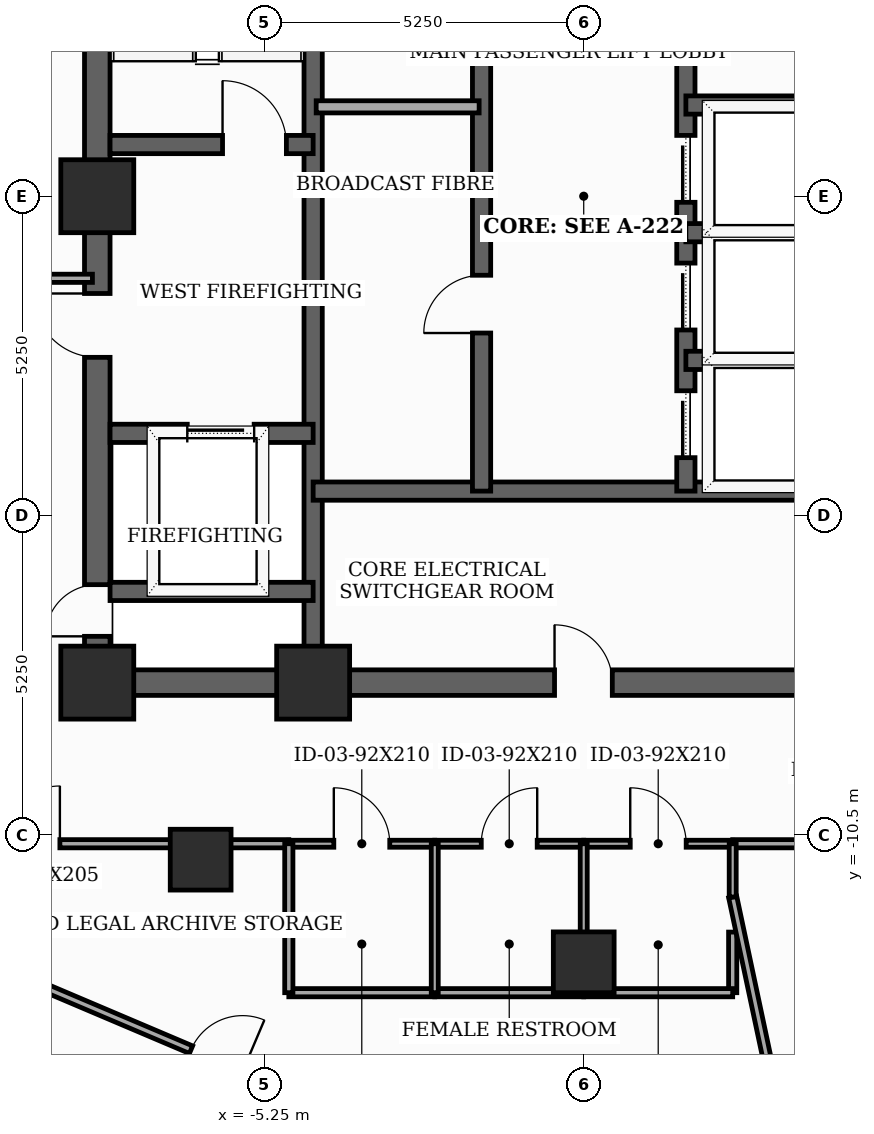
"""IFC4 building model, lengths in metres.
Left out: names, types, materials, properties, quantities, classifications, styles, units other than length and angle.
Written with IfcOpenShell. Run it as: python <this file> out.ifc"""

import sys

from ifc_helpers import new_model, si_unit, direction, frame, frame_2d, origin, origin_2d, place, context, subcontext, project, spatial, rectangle, extrude, element, fill, save


model = new_model("IFC4")
c1 = context("Model", 3, precision=1e-05, world=origin(), true_north=direction((0.0, 1.0)))
c2 = subcontext(c1, "Body", "Model", "MODEL_VIEW")
j1 = project(units=[si_unit("LENGTHUNIT", "METRE"), si_unit("PLANEANGLEUNIT", "RADIAN")], contexts=[c1])
p1 = place(None, origin())
s1 = spatial("IfcSite", under=j1, at=p1, CompositionType="ELEMENT")
p2 = place(p1, origin())
s2 = spatial("IfcBuilding", under=s1, at=p2, CompositionType="ELEMENT")
p3 = place(p2, frame((0.0, 0.0, 222.6)))
s3 = spatial("IfcBuildingStorey", under=s2, at=p3, CompositionType="ELEMENT", Elevation=222.6)
for number, where, z_axis, x_axis in (
    (1, (-8.0, -8.0, 0.0), (0.0, 0.0, 1.0), (1.0, 0.0, 0.0)),
    (2, (-4.45, -8.0, 0.0), (0.0, 0.0, 1.0), (1.0, 0.0, 0.0)),
    (3, (-8.0, 0.0, 0.0), (0.0, 0.0, 1.0), (1.0, 0.0, 0.0)),
):
    element("IfcColumn", number, at=place(p3, frame(where, z_axis=z_axis, x_axis=x_axis)), inside=s3, PredefinedType="COLUMN", context=c2, shape_type="SweptSolid", body=[
        extrude(rectangle(XDim=1.2, YDim=1.2, at=origin_2d()), origin(), (0.0, 0.0, 1.0), 3.7),
    ])
for number, where, z_axis, x_axis in (
    (4, (-6.3, -10.912, 0.0), (0.0, 0.0, 1.0), (1.0, 0.0, 0.0)),
    (5, (0.0, -12.6, 0.0), (0.0, 0.0, 1.0), (1.0, 0.0, 0.0)),
):
    element("IfcColumn", number, at=place(p3, frame(where, z_axis=z_axis, x_axis=x_axis)), inside=s3, PredefinedType="COLUMN", context=c2, shape_type="SweptSolid", body=[
        extrude(rectangle(XDim=1.0, YDim=1.0, at=origin_2d()), origin(), (0.0, 0.0, 1.0), 3.7),
    ])
p4 = place(p3, frame((-8.0, -8.0, 0.0), z_axis=(0.0, 0.0, 1.0), x_axis=(0.0, 1.0, 0.0)))
e6 = element("IfcWall", 6, at=p4, inside=s3, PredefinedType="SHEAR", context=c2, shape_type="SweptSolid", body=[
    extrude(rectangle(XDim=16.0, YDim=0.42, at=frame_2d((8.0, 0.0))), origin(), (0.0, 0.0, 1.0), 3.5),
])
p5 = place(p4, frame((0.761, 0.0, 0.0)))
e7 = element("IfcOpeningElement", 7, at=p5, cuts=e6, PredefinedType="OPENING", context=c2, shape_type="SweptSolid", body=[
    extrude(rectangle(XDim=0.85, YDim=2.02, at=frame_2d((0.425, 1.01))), frame((0.0, 0.22, 0.0), z_axis=(0.0, -1.0, 0.0), x_axis=(1.0, 0.0, 0.0)), (0.0, 0.0, 1.0), 0.44),
])
p6 = place(p4, frame((5.35, 0.0, 0.0)))
e8 = element("IfcOpeningElement", 8, at=p6, cuts=e6, PredefinedType="OPENING", context=c2, shape_type="SweptSolid", body=[
    extrude(rectangle(XDim=1.05, YDim=2.15, at=frame_2d((0.525, 1.075))), frame((0.0, 0.22, 0.0), z_axis=(0.0, -1.0, 0.0), x_axis=(1.0, 0.0, 0.0)), (0.0, 0.0, 1.0), 0.44),
])
p7 = place(p3, frame((-8.0, -8.0, 0.0), z_axis=(0.0, 0.0, 1.0), x_axis=(1.0, 0.0, 0.0)))
e9 = element("IfcWall", 9, at=p7, inside=s3, PredefinedType="SHEAR", context=c2, shape_type="SweptSolid", body=[
    extrude(rectangle(XDim=16.0, YDim=0.42, at=frame_2d((8.0, 0.0))), origin(), (0.0, 0.0, 1.0), 3.5),
])
p8 = place(p7, frame((7.52, 0.0, 0.0)))
e10 = element("IfcOpeningElement", 10, at=p8, cuts=e9, PredefinedType="OPENING", context=c2, shape_type="SweptSolid", body=[
    extrude(rectangle(XDim=0.95, YDim=2.1, at=frame_2d((0.475, 1.05))), frame((0.0, 0.22, 0.0), z_axis=(0.0, -1.0, 0.0), x_axis=(1.0, 0.0, 0.0)), (0.0, 0.0, 1.0), 0.44),
])
p9 = place(p3, frame((-4.45, -7.79, 0.0), z_axis=(0.0, 0.0, 1.0), x_axis=(0.0, 1.0, 0.0)))
e11 = element("IfcWall", 11, at=p9, inside=s3, PredefinedType="SHEAR", context=c2, shape_type="SweptSolid", body=[
    extrude(rectangle(XDim=15.58, YDim=0.3, at=frame_2d((7.79, 0.0))), origin(), (0.0, 0.0, 1.0), 3.5),
])
p10 = place(p3, frame((-7.79, 0.85, 0.0), z_axis=(0.0, 0.0, 1.0), x_axis=(1.0, 0.0, 0.0)))
e12 = element("IfcWall", 12, at=p10, inside=s3, PredefinedType="SHEAR", context=c2, shape_type="SweptSolid", body=[
    extrude(rectangle(XDim=3.34, YDim=0.3, at=frame_2d((1.67, 0.0))), origin(), (0.0, 0.0, 1.0), 3.5),
])
p11 = place(p10, frame((1.85, 0.0, 0.0)))
e13 = element("IfcOpeningElement", 13, at=p11, cuts=e12, PredefinedType="OPENING", context=c2, shape_type="SweptSolid", body=[
    extrude(rectangle(XDim=1.05, YDim=2.15, at=frame_2d((0.525, 1.075))), frame((0.0, 0.16, 0.0), z_axis=(0.0, -1.0, 0.0), x_axis=(1.0, 0.0, 0.0)), (0.0, 0.0, 1.0), 0.32),
])
p12 = place(p3, frame((-7.79, -3.9, 0.0), z_axis=(0.0, 0.0, 1.0), x_axis=(1.0, 0.0, 0.0)))
e14 = element("IfcWall", 14, at=p12, inside=s3, PredefinedType="SHEAR", context=c2, shape_type="SweptSolid", body=[
    extrude(rectangle(XDim=3.34, YDim=0.3, at=frame_2d((1.67, 0.0))), origin(), (0.0, 0.0, 1.0), 3.5),
])
p13 = place(p12, frame((1.27, 0.0, 0.0)))
e15 = element("IfcOpeningElement", 15, at=p13, cuts=e14, PredefinedType="OPENING", context=c2, shape_type="SweptSolid", body=[
    extrude(rectangle(XDim=1.1, YDim=2.1, at=frame_2d((0.55, 1.05))), frame((0.0, 0.16, 0.0), z_axis=(0.0, -1.0, 0.0), x_axis=(1.0, 0.0, 0.0)), (0.0, 0.0, 1.0), 0.32),
])
p14 = place(p3, frame((-7.79, -6.5, 0.0), z_axis=(0.0, 0.0, 1.0), x_axis=(1.0, 0.0, 0.0)))
e16 = element("IfcWall", 16, at=p14, inside=s3, PredefinedType="SHEAR", context=c2, shape_type="SweptSolid", body=[
    extrude(rectangle(XDim=3.34, YDim=0.3, at=frame_2d((1.67, 0.0))), origin(), (0.0, 0.0, 1.0), 3.5),
])
p15 = place(p3, frame((-4.45, -4.85, 0.0), z_axis=(0.0, 0.0, 1.0), x_axis=(1.0, 0.0, 0.0)))
e17 = element("IfcWall", 17, at=p15, inside=s3, PredefinedType="SHEAR", context=c2, shape_type="SweptSolid", body=[
    extrude(rectangle(XDim=8.9, YDim=0.3, at=frame_2d((4.45, 0.0))), origin(), (0.0, 0.0, 1.0), 3.5),
])
p16 = place(p3, frame((-1.68, -4.85, 0.0), z_axis=(0.0, 0.0, 1.0), x_axis=(0.0, 1.0, 0.0)))
e18 = element("IfcWall", 18, at=p16, inside=s3, PredefinedType="SHEAR", context=c2, shape_type="SweptSolid", body=[
    extrude(rectangle(XDim=12.64, YDim=0.3, at=frame_2d((6.32, 0.0))), origin(), (0.0, 0.0, 1.0), 3.5),
])
p17 = place(p16, frame((2.6, 0.0, 0.0)))
e19 = element("IfcOpeningElement", 19, at=p17, cuts=e18, PredefinedType="OPENING", context=c2, shape_type="SweptSolid", body=[
    extrude(rectangle(XDim=0.95, YDim=2.1, at=frame_2d((0.475, 1.05))), frame((0.0, 0.16, 0.0), z_axis=(0.0, -1.0, 0.0), x_axis=(1.0, 0.0, 0.0)), (0.0, 0.0, 1.0), 0.32),
])
p18 = place(p16, frame((8.8, 0.0, 0.0)))
e20 = element("IfcOpeningElement", 20, at=p18, cuts=e18, PredefinedType="OPENING", context=c2, shape_type="SweptSolid", body=[
    extrude(rectangle(XDim=0.95, YDim=2.1, at=frame_2d((0.475, 1.05))), frame((0.0, 0.16, 0.0), z_axis=(0.0, -1.0, 0.0), x_axis=(1.0, 0.0, 0.0)), (0.0, 0.0, 1.0), 0.32),
])
p19 = place(p3, frame((1.68, -4.85, 0.0), z_axis=(0.0, 0.0, 1.0), x_axis=(0.0, 1.0, 0.0)))
e21 = element("IfcWall", 21, at=p19, inside=s3, PredefinedType="SHEAR", context=c2, shape_type="SweptSolid", body=[
    extrude(rectangle(XDim=12.64, YDim=0.3, at=frame_2d((6.32, 0.0))), origin(), (0.0, 0.0, 1.0), 3.5),
])
p20 = place(p19, frame((0.55, 0.0, 0.0)))
e22 = element("IfcOpeningElement", 22, at=p20, cuts=e21, PredefinedType="OPENING", context=c2, shape_type="SweptSolid", body=[
    extrude(rectangle(XDim=1.1, YDim=2.1, at=frame_2d((0.55, 1.05))), frame((0.0, 0.16, 0.0), z_axis=(0.0, -1.0, 0.0), x_axis=(1.0, 0.0, 0.0)), (0.0, 0.0, 1.0), 0.32),
])
p21 = place(p19, frame((2.65, 0.0, 0.0)))
e23 = element("IfcOpeningElement", 23, at=p21, cuts=e21, PredefinedType="OPENING", context=c2, shape_type="SweptSolid", body=[
    extrude(rectangle(XDim=1.1, YDim=2.1, at=frame_2d((0.55, 1.05))), frame((0.0, 0.16, 0.0), z_axis=(0.0, -1.0, 0.0), x_axis=(1.0, 0.0, 0.0)), (0.0, 0.0, 1.0), 0.32),
])
p22 = place(p19, frame((4.75, 0.0, 0.0)))
e24 = element("IfcOpeningElement", 24, at=p22, cuts=e21, PredefinedType="OPENING", context=c2, shape_type="SweptSolid", body=[
    extrude(rectangle(XDim=1.1, YDim=2.1, at=frame_2d((0.55, 1.05))), frame((0.0, 0.16, 0.0), z_axis=(0.0, -1.0, 0.0), x_axis=(1.0, 0.0, 0.0)), (0.0, 0.0, 1.0), 0.32),
])
p23 = place(p19, frame((8.9, 0.0, 0.0)))
e25 = element("IfcOpeningElement", 25, at=p23, cuts=e21, PredefinedType="OPENING", context=c2, shape_type="SweptSolid", body=[
    extrude(rectangle(XDim=0.95, YDim=2.1, at=frame_2d((0.475, 1.05))), frame((0.0, 0.16, 0.0), z_axis=(0.0, -1.0, 0.0), x_axis=(1.0, 0.0, 0.0)), (0.0, 0.0, 1.0), 0.32),
])
for number, where, z_axis, x_axis in (
    (26, (1.68, 1.5, 0.0), (0.0, 0.0, 1.0), (1.0, 0.0, 0.0)),
    (27, (1.68, -2.7, 0.0), (0.0, 0.0, 1.0), (1.0, 0.0, 0.0)),
    (28, (1.68, -0.6, 0.0), (0.0, 0.0, 1.0), (1.0, 0.0, 0.0)),
):
    element("IfcWall", number, at=place(p3, frame(where, z_axis=z_axis, x_axis=x_axis)), inside=s3, PredefinedType="SHEAR", context=c2, shape_type="SweptSolid", body=[
        extrude(rectangle(XDim=2.77, YDim=0.3, at=frame_2d((1.385, 0.0))), origin(), (0.0, 0.0, 1.0), 3.5),
    ])
p24 = place(p3, frame((-4.4, 1.47, 0.0), z_axis=(0.0, 0.0, 1.0), x_axis=(1.0, 0.0, 0.0)))
e29 = element("IfcWall", 29, at=p24, inside=s3, PredefinedType="SOLIDWALL", context=c2, shape_type="SweptSolid", body=[
    extrude(rectangle(XDim=2.68, YDim=0.2, at=frame_2d((1.34, 0.0))), origin(), (0.0, 0.0, 1.0), 3.5),
])
p25 = place(p3, frame((-8.08, -1.35, 0.0), z_axis=(0.0, 0.0, 1.0), x_axis=(-1.0, 0.0, 0.0)))
e30 = element("IfcWall", 30, at=p25, inside=s3, PredefinedType="PARTITIONING", context=c2, shape_type="SweptSolid", body=[
    extrude(rectangle(XDim=2.57, YDim=0.135, at=frame_2d((1.285, 0.0))), origin(), (0.0, 0.0, 1.0), 2.885),
])
p26 = place(p3, frame((-10.15, -10.65, 0.0), z_axis=(0.0, 0.0, 1.0), x_axis=(1.0, 0.0, 0.0)))
e31 = element("IfcWall", 31, at=p26, inside=s3, PredefinedType="PARTITIONING", context=c2, shape_type="SweptSolid", body=[
    extrude(rectangle(XDim=5.3, YDim=0.135, at=frame_2d((2.65, 0.0))), origin(), (0.0, 0.0, 1.0), 2.075),
])
p27 = place(p26, frame((0.585, 0.0, 0.0)))
e32 = element("IfcOpeningElement", 32, at=p27, cuts=e31, PredefinedType="OPENING", context=c2, shape_type="SweptSolid", body=[
    extrude(rectangle(XDim=0.95, YDim=2.025, at=frame_2d((0.475, 1.012))), frame((0.0, 0.077, 0.0), z_axis=(0.0, -1.0, 0.0), x_axis=(1.0, 0.0, 0.0)), (0.0, 0.0, 1.0), 0.155),
])
p28 = place(p3, frame((-4.85, -10.65, 0.0), z_axis=(0.0, 0.0, 1.0), x_axis=(1.0, 0.0, 0.0)))
e33 = element("IfcWall", 33, at=p28, inside=s3, PredefinedType="PARTITIONING", context=c2, shape_type="SweptSolid", body=[
    extrude(rectangle(XDim=2.4, YDim=0.115, at=frame_2d((1.2, 0.0))), origin(), (0.0, 0.0, 1.0), 3.5),
])
p29 = place(p28, frame((0.74, 0.0, 0.0)))
e34 = element("IfcOpeningElement", 34, at=p29, cuts=e33, PredefinedType="OPENING", context=c2, shape_type="SweptSolid", body=[
    extrude(rectangle(XDim=0.92, YDim=2.1, at=frame_2d((0.46, 1.05))), frame((0.0, 0.067, 0.0), z_axis=(0.0, -1.0, 0.0), x_axis=(1.0, 0.0, 0.0)), (0.0, 0.0, 1.0), 0.135),
])
p30 = place(p3, frame((-2.45, -10.65, 0.0), z_axis=(0.0, 0.0, 1.0), x_axis=(1.0, 0.0, 0.0)))
e35 = element("IfcWall", 35, at=p30, inside=s3, PredefinedType="PARTITIONING", context=c2, shape_type="SweptSolid", body=[
    extrude(rectangle(XDim=2.45, YDim=0.115, at=frame_2d((1.225, 0.0))), origin(), (0.0, 0.0, 1.0), 2.885),
])
p31 = place(p30, frame((0.765, 0.0, 0.0)))
e36 = element("IfcOpeningElement", 36, at=p31, cuts=e35, PredefinedType="OPENING", context=c2, shape_type="SweptSolid", body=[
    extrude(rectangle(XDim=0.92, YDim=2.1, at=frame_2d((0.46, 1.05))), frame((0.0, 0.067, 0.0), z_axis=(0.0, -1.0, 0.0), x_axis=(1.0, 0.0, 0.0)), (0.0, 0.0, 1.0), 0.135),
])
p32 = place(p3, frame((0.0, -10.65, 0.0), z_axis=(0.0, 0.0, 1.0), x_axis=(1.0, 0.0, 0.0)))
e37 = element("IfcWall", 37, at=p32, inside=s3, PredefinedType="PARTITIONING", context=c2, shape_type="SweptSolid", body=[
    extrude(rectangle(XDim=2.45, YDim=0.115, at=frame_2d((1.225, 0.0))), origin(), (0.0, 0.0, 1.0), 3.5),
])
p33 = place(p32, frame((0.765, 0.0, 0.0)))
e38 = element("IfcOpeningElement", 38, at=p33, cuts=e37, PredefinedType="OPENING", context=c2, shape_type="SweptSolid", body=[
    extrude(rectangle(XDim=0.92, YDim=2.1, at=frame_2d((0.46, 1.05))), frame((0.0, 0.067, 0.0), z_axis=(0.0, -1.0, 0.0), x_axis=(1.0, 0.0, 0.0)), (0.0, 0.0, 1.0), 0.135),
])
p34 = place(p3, frame((2.45, -10.65, 0.0), z_axis=(0.0, 0.0, 1.0), x_axis=(1.0, 0.0, 0.0)))
e39 = element("IfcWall", 39, at=p34, inside=s3, PredefinedType="PARTITIONING", context=c2, shape_type="SweptSolid", body=[
    extrude(rectangle(XDim=7.7, YDim=0.135, at=frame_2d((3.85, 0.0))), origin(), (0.0, 0.0, 1.0), 2.885),
])
p35 = place(p3, frame((-2.45, -13.1, 0.0), z_axis=(0.0, 0.0, 1.0), x_axis=(-1.0, 0.0, 0.0)))
e40 = element("IfcWall", 40, at=p35, inside=s3, PredefinedType="PARTITIONING", context=c2, shape_type="SweptSolid", body=[
    extrude(rectangle(XDim=2.4, YDim=0.135, at=frame_2d((1.2, 0.0))), origin(), (0.0, 0.0, 1.0), 3.5),
])
p36 = place(p3, frame((-4.85, -13.1, 0.0), z_axis=(0.0, 0.0, 1.0), x_axis=(0.0, 1.0, 0.0)))
e41 = element("IfcWall", 41, at=p36, inside=s3, PredefinedType="PARTITIONING", context=c2, shape_type="SweptSolid", body=[
    extrude(rectangle(XDim=2.45, YDim=0.135, at=frame_2d((1.225, 0.0))), origin(), (0.0, 0.0, 1.0), 2.885),
])
p37 = place(p3, frame((-9.1, -12.916, 0.0), z_axis=(0.0, 0.0, 1.0), x_axis=(0.920506675175, -0.390726836752, 0.0)))
e42 = element("IfcWall", 42, at=p37, inside=s3, PredefinedType="PARTITIONING", context=c2, shape_type="SweptSolid", body=[
    extrude(rectangle(XDim=6.659, YDim=0.135, at=frame_2d((3.33, 0.0))), origin(), (0.0, 0.0, 1.0), 2.985),
])
p38 = place(p37, frame((2.87, 0.0, 0.0)))
e43 = element("IfcOpeningElement", 43, at=p38, cuts=e42, PredefinedType="OPENING", context=c2, shape_type="SweptSolid", body=[
    extrude(rectangle(XDim=0.92, YDim=2.1, at=frame_2d((0.46, 1.05))), frame((0.0, 0.077, 0.0), z_axis=(0.0, -1.0, 0.0), x_axis=(1.0, 0.0, 0.0)), (0.0, 0.0, 1.0), 0.155),
])
p39 = place(p3, frame((0.0, -13.1, 0.0), z_axis=(0.0, 0.0, 1.0), x_axis=(-1.0, 0.0, 0.0)))
e44 = element("IfcWall", 44, at=p39, inside=s3, PredefinedType="PARTITIONING", context=c2, shape_type="SweptSolid", body=[
    extrude(rectangle(XDim=2.45, YDim=0.135, at=frame_2d((1.225, 0.0))), origin(), (0.0, 0.0, 1.0), 3.5),
])
p40 = place(p3, frame((2.45, -12.103, 0.0), z_axis=(0.0, 0.0, 1.0), x_axis=(0.0, -1.0, 0.0)))
e45 = element("IfcWall", 45, at=p40, inside=s3, PredefinedType="PARTITIONING", context=c2, shape_type="SweptSolid", body=[
    extrude(rectangle(XDim=0.997, YDim=0.135, at=frame_2d((0.499, 0.0))), origin(), (0.0, 0.0, 1.0), 2.885),
])
p41 = place(p3, frame((2.45, -13.1, 0.0), z_axis=(0.0, 0.0, 1.0), x_axis=(-1.0, 0.0, 0.0)))
e46 = element("IfcWall", 46, at=p41, inside=s3, PredefinedType="PARTITIONING", context=c2, shape_type="SweptSolid", body=[
    extrude(rectangle(XDim=2.45, YDim=0.135, at=frame_2d((1.225, 0.0))), origin(), (0.0, 0.0, 1.0), 2.985),
])
p42 = place(p3, frame((3.268, -15.373, 0.0), z_axis=(0.0, 0.0, 1.0), x_axis=(-0.208002774368, 0.978128235895, 0.0)))
e47 = element("IfcWall", 47, at=p42, inside=s3, PredefinedType="PARTITIONING", context=c2, shape_type="SweptSolid", body=[
    extrude(rectangle(XDim=3.933, YDim=0.135, at=frame_2d((1.967, 0.0))), origin(), (0.0, 0.0, 1.0), 2.885),
])
for number, where, z_axis, x_axis in (
    (48, (-2.45, -13.1, 0.0), (0.0, 0.0, 1.0), (0.0, 1.0, 0.0)),
    (49, (0.0, -13.1, 0.0), (0.0, 0.0, 1.0), (0.0, 1.0, 0.0)),
):
    element("IfcWall", number, at=place(p3, frame(where, z_axis=z_axis, x_axis=x_axis)), inside=s3, PredefinedType="PARTITIONING", context=c2, shape_type="SweptSolid", body=[
        extrude(rectangle(XDim=2.45, YDim=0.115, at=frame_2d((1.225, 0.0))), origin(), (0.0, 0.0, 1.0), 2.885),
    ])
p43 = place(p3, frame((2.45, -11.526, 0.0), z_axis=(0.0, 0.0, 1.0), x_axis=(0.0, 1.0, 0.0)))
e50 = element("IfcWall", 50, at=p43, inside=s3, PredefinedType="PARTITIONING", context=c2, shape_type="SweptSolid", body=[
    extrude(rectangle(XDim=0.876, YDim=0.115, at=frame_2d((0.438, 0.0))), origin(), (0.0, 0.0, 1.0), 3.5),
])
p44 = place(p5, origin())
e51 = element("IfcDoor", 51, at=p44, inside=s3, OperationType="SINGLE_SWING_LEFT", PredefinedType="TRAPDOOR", context=c2, shape_type="SweptSolid", body=[
    extrude(rectangle(XDim=0.85, YDim=2.02, at=frame_2d((0.425, 1.01))), frame((0.0, 0.025, 0.0), z_axis=(0.0, -1.0, 0.0), x_axis=(1.0, 0.0, 0.0)), (0.0, 0.0, 1.0), 0.05),
])
fill(e7, e51)
p45 = place(p6, origin())
e52 = element("IfcDoor", 52, at=p45, inside=s3, OperationType="SINGLE_SWING_RIGHT", PredefinedType="DOOR", context=c2, shape_type="SweptSolid", body=[
    extrude(rectangle(XDim=1.05, YDim=2.15, at=frame_2d((0.525, 1.075))), frame((0.0, 0.025, 0.0), z_axis=(0.0, -1.0, 0.0), x_axis=(1.0, 0.0, 0.0)), (0.0, 0.0, 1.0), 0.05),
])
fill(e8, e52)
p46 = place(p8, origin())
e53 = element("IfcDoor", 53, at=p46, inside=s3, OperationType="SINGLE_SWING_LEFT", PredefinedType="DOOR", context=c2, shape_type="SweptSolid", body=[
    extrude(rectangle(XDim=0.95, YDim=2.1, at=frame_2d((0.475, 1.05))), frame((0.0, 0.025, 0.0), z_axis=(0.0, -1.0, 0.0), x_axis=(1.0, 0.0, 0.0)), (0.0, 0.0, 1.0), 0.05),
])
fill(e10, e53)
p47 = place(p11, origin())
e54 = element("IfcDoor", 54, at=p47, inside=s3, OperationType="SINGLE_SWING_LEFT", PredefinedType="DOOR", context=c2, shape_type="SweptSolid", body=[
    extrude(rectangle(XDim=1.05, YDim=2.15, at=frame_2d((0.525, 1.075))), frame((0.0, 0.025, 0.0), z_axis=(0.0, -1.0, 0.0), x_axis=(1.0, 0.0, 0.0)), (0.0, 0.0, 1.0), 0.05),
])
fill(e13, e54)
p48 = place(p13, origin())
e55 = element("IfcDoor", 55, at=p48, inside=s3, OperationType="SLIDING_TO_LEFT", PredefinedType="DOOR", context=c2, shape_type="SweptSolid", body=[
    extrude(rectangle(XDim=1.1, YDim=2.1, at=frame_2d((0.55, 1.05))), frame((0.0, 0.025, 0.0), z_axis=(0.0, -1.0, 0.0), x_axis=(1.0, 0.0, 0.0)), (0.0, 0.0, 1.0), 0.05),
])
fill(e15, e55)
p49 = place(p17, origin())
e56 = element("IfcDoor", 56, at=p49, inside=s3, OperationType="SINGLE_SWING_LEFT", PredefinedType="DOOR", context=c2, shape_type="SweptSolid", body=[
    extrude(rectangle(XDim=0.95, YDim=2.1, at=frame_2d((0.475, 1.05))), frame((0.0, 0.025, 0.0), z_axis=(0.0, -1.0, 0.0), x_axis=(1.0, 0.0, 0.0)), (0.0, 0.0, 1.0), 0.05),
])
fill(e19, e56)
p50 = place(p20, origin())
e57 = element("IfcDoor", 57, at=p50, inside=s3, OperationType="SLIDING_TO_LEFT", PredefinedType="DOOR", context=c2, shape_type="SweptSolid", body=[
    extrude(rectangle(XDim=1.1, YDim=2.1, at=frame_2d((0.55, 1.05))), frame((0.0, 0.025, 0.0), z_axis=(0.0, -1.0, 0.0), x_axis=(1.0, 0.0, 0.0)), (0.0, 0.0, 1.0), 0.05),
])
fill(e22, e57)
p51 = place(p21, origin())
e58 = element("IfcDoor", 58, at=p51, inside=s3, OperationType="SLIDING_TO_LEFT", PredefinedType="DOOR", context=c2, shape_type="SweptSolid", body=[
    extrude(rectangle(XDim=1.1, YDim=2.1, at=frame_2d((0.55, 1.05))), frame((0.0, 0.025, 0.0), z_axis=(0.0, -1.0, 0.0), x_axis=(1.0, 0.0, 0.0)), (0.0, 0.0, 1.0), 0.05),
])
fill(e23, e58)
p52 = place(p22, origin())
e59 = element("IfcDoor", 59, at=p52, inside=s3, OperationType="SLIDING_TO_LEFT", PredefinedType="DOOR", context=c2, shape_type="SweptSolid", body=[
    extrude(rectangle(XDim=1.1, YDim=2.1, at=frame_2d((0.55, 1.05))), frame((0.0, 0.025, 0.0), z_axis=(0.0, -1.0, 0.0), x_axis=(1.0, 0.0, 0.0)), (0.0, 0.0, 1.0), 0.05),
])
fill(e24, e59)
p53 = place(p27, origin())
e60 = element("IfcDoor", 60, at=p53, inside=s3, OperationType="SINGLE_SWING_RIGHT", PredefinedType="DOOR", context=c2, shape_type="SweptSolid", body=[
    extrude(rectangle(XDim=0.95, YDim=2.025, at=frame_2d((0.475, 1.012))), frame((0.0, 0.025, 0.0), z_axis=(0.0, -1.0, 0.0), x_axis=(1.0, 0.0, 0.0)), (0.0, 0.0, 1.0), 0.05),
])
fill(e32, e60)
p54 = place(p29, origin())
e61 = element("IfcDoor", 61, at=p54, inside=s3, OperationType="SINGLE_SWING_LEFT", PredefinedType="DOOR", context=c2, shape_type="SweptSolid", body=[
    extrude(rectangle(XDim=0.92, YDim=2.1, at=frame_2d((0.46, 1.05))), frame((0.0, 0.025, 0.0), z_axis=(0.0, -1.0, 0.0), x_axis=(1.0, 0.0, 0.0)), (0.0, 0.0, 1.0), 0.05),
])
fill(e34, e61)
p55 = place(p31, origin())
e62 = element("IfcDoor", 62, at=p55, inside=s3, OperationType="SINGLE_SWING_RIGHT", PredefinedType="DOOR", context=c2, shape_type="SweptSolid", body=[
    extrude(rectangle(XDim=0.92, YDim=2.1, at=frame_2d((0.46, 1.05))), frame((0.0, 0.025, 0.0), z_axis=(0.0, -1.0, 0.0), x_axis=(1.0, 0.0, 0.0)), (0.0, 0.0, 1.0), 0.05),
])
fill(e36, e62)
p56 = place(p33, origin())
e63 = element("IfcDoor", 63, at=p56, inside=s3, OperationType="SINGLE_SWING_LEFT", PredefinedType="DOOR", context=c2, shape_type="SweptSolid", body=[
    extrude(rectangle(XDim=0.92, YDim=2.1, at=frame_2d((0.46, 1.05))), frame((0.0, 0.025, 0.0), z_axis=(0.0, -1.0, 0.0), x_axis=(1.0, 0.0, 0.0)), (0.0, 0.0, 1.0), 0.05),
])
fill(e38, e63)
p57 = place(p38, origin())
e64 = element("IfcDoor", 64, at=p57, inside=s3, OperationType="SINGLE_SWING_RIGHT", PredefinedType="DOOR", context=c2, shape_type="SweptSolid", body=[
    extrude(rectangle(XDim=0.92, YDim=2.1, at=frame_2d((0.46, 1.05))), frame((0.0, 0.025, 0.0), z_axis=(0.0, -1.0, 0.0), x_axis=(1.0, 0.0, 0.0)), (0.0, 0.0, 1.0), 0.05),
])
fill(e43, e64)
save(model, sys.argv[1])
